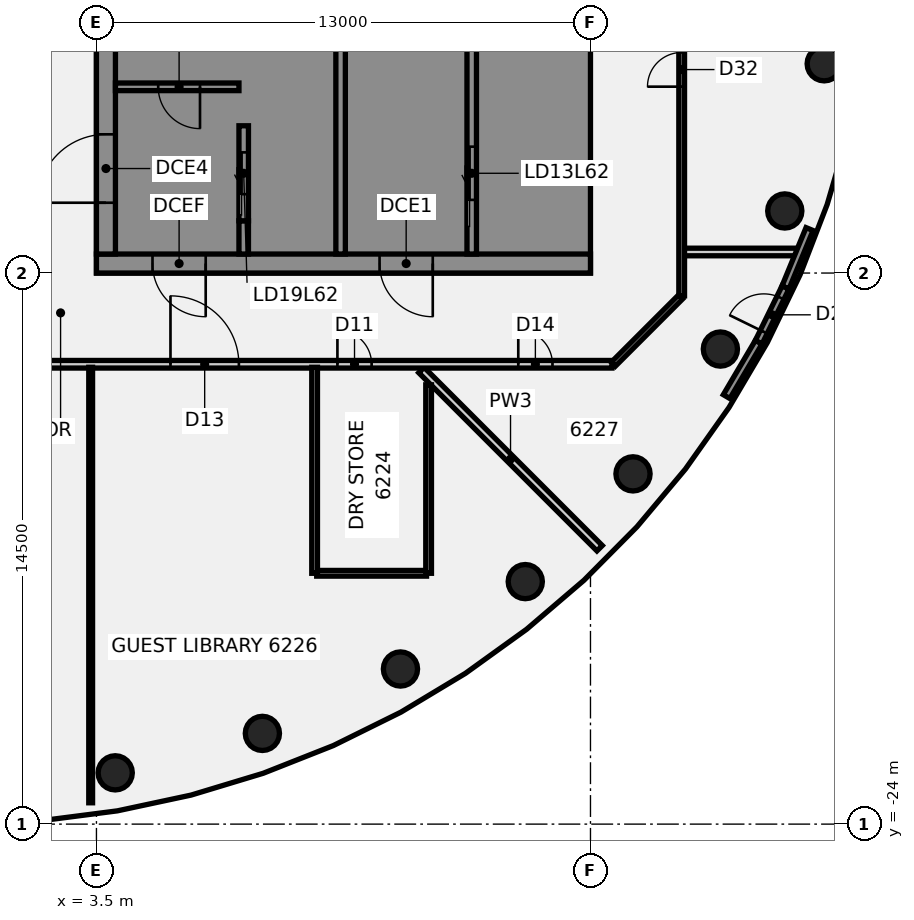
"""IFC4 building model, lengths in metres.
Left out: names, types, materials, properties, quantities, classifications, styles, units other than length and angle.
Written with IfcOpenShell. Run it as: python <this file> out.ifc"""

import sys

from ifc_helpers import new_model, si_unit, direction, frame, frame_2d, origin, origin_2d, place, context, subcontext, project, spatial, polyline, rectangle, circle, outline, extrude, element, fill, save


model = new_model("IFC4")
c1 = context("Model", 3, precision=1e-05, world=origin(), true_north=direction((0.0, 1.0)))
c2 = subcontext(c1, "Body", "Model", "MODEL_VIEW")
j1 = project(units=[si_unit("LENGTHUNIT", "METRE"), si_unit("PLANEANGLEUNIT", "RADIAN")], contexts=[c1])
p1 = place(None, origin())
s1 = spatial("IfcSite", under=j1, at=p1, CompositionType="ELEMENT")
p2 = place(p1, origin())
s2 = spatial("IfcBuilding", under=s1, at=p2, CompositionType="ELEMENT")
p3 = place(p2, frame((0.0, 0.0, 245.1)))
s3 = spatial("IfcBuildingStorey", under=s2, at=p3, CompositionType="ELEMENT", Elevation=245.1)
for number, where, z_axis, x_axis in (
    (1, (3.994, -22.651, -0.14), (0.0, 0.0, 1.0), (1.0, 0.0, 0.0)),
    (2, (7.866, -21.613, -0.14), (0.0, 0.0, 1.0), (1.0, 0.0, 0.0)),
    (3, (11.5, -19.919, -0.14), (0.0, 0.0, 1.0), (1.0, 0.0, 0.0)),
    (4, (14.784, -17.619, -0.14), (0.0, 0.0, 1.0), (1.0, 0.0, 0.0)),
    (5, (17.619, -14.784, -0.14), (0.0, 0.0, 1.0), (1.0, 0.0, 0.0)),
    (6, (19.919, -11.5, -0.14), (0.0, 0.0, 1.0), (1.0, 0.0, 0.0)),
    (7, (21.613, -7.866, -0.14), (0.0, 0.0, 1.0), (1.0, 0.0, 0.0)),
    (8, (22.651, -3.994, -0.14), (0.0, 0.0, 1.0), (1.0, 0.0, 0.0)),
):
    element("IfcColumn", number, at=place(p3, frame(where, z_axis=z_axis, x_axis=x_axis)), inside=s3, PredefinedType="COLUMN", context=c2, shape_type="SweptSolid", body=[
        extrude(circle(Radius=0.45, at=origin_2d()), origin(), (0.0, 0.0, 1.0), 3.6),
    ])
p4 = place(p3, frame((12.052, -12.052, 0.0), z_axis=(0.0, 0.0, 1.0), x_axis=(0.707106781187, -0.707106781187, 0.0)))
e9 = element("IfcWall", 9, at=p4, inside=s3, PredefinedType="PARTITIONING", context=c2, shape_type="SweptSolid", body=[
    extrude(rectangle(XDim=6.631, YDim=0.2, at=frame_2d((3.315, 0.0))), origin(), (0.0, 0.0, 1.0), 2.864),
])
p5 = place(p3, frame((-17.1, -11.9, 0.0), z_axis=(0.0, 0.0, 1.0), x_axis=(1.0, 0.0, 0.0)))
e10 = element("IfcWall", 10, at=p5, inside=s3, PredefinedType="PARTITIONING", context=c2, shape_type="SweptSolid", body=[
    extrude(rectangle(XDim=34.165, YDim=0.2, at=frame_2d((17.083, 0.0))), origin(), (0.0, 0.0, 1.0), 2.864),
])
p6 = place(p5, frame((9.85, 0.0, 0.0)))
e11 = element("IfcOpeningElement", 11, at=p6, cuts=e10, PredefinedType="OPENING", context=c2, shape_type="SweptSolid", body=[
    extrude(rectangle(XDim=0.9, YDim=2.1, at=frame_2d((0.45, 1.05))), frame((0.0, 0.11, 0.0), z_axis=(0.0, -1.0, 0.0), x_axis=(1.0, 0.0, 0.0)), (0.0, 0.0, 1.0), 0.22),
])
p7 = place(p5, frame((26.941, 0.0, 0.0)))
e12 = element("IfcOpeningElement", 12, at=p7, cuts=e10, PredefinedType="OPENING", context=c2, shape_type="SweptSolid", body=[
    extrude(rectangle(XDim=0.9, YDim=2.1, at=frame_2d((0.45, 1.05))), frame((0.0, 0.11, 0.0), z_axis=(0.0, -1.0, 0.0), x_axis=(1.0, 0.0, 0.0)), (0.0, 0.0, 1.0), 0.22),
])
p8 = place(p5, frame((16.059, 0.0, 0.0)))
e13 = element("IfcOpeningElement", 13, at=p8, cuts=e10, PredefinedType="OPENING", context=c2, shape_type="SweptSolid", body=[
    extrude(rectangle(XDim=1.8, YDim=2.1, at=frame_2d((0.9, 1.05))), frame((0.0, 0.11, 0.0), z_axis=(0.0, -1.0, 0.0), x_axis=(1.0, 0.0, 0.0)), (0.0, 0.0, 1.0), 0.22),
])
p9 = place(p5, frame((22.548, 0.0, 0.0)))
e14 = element("IfcOpeningElement", 14, at=p9, cuts=e10, PredefinedType="OPENING", context=c2, shape_type="SweptSolid", body=[
    extrude(rectangle(XDim=1.8, YDim=2.1, at=frame_2d((0.9, 1.05))), frame((0.0, 0.11, 0.0), z_axis=(0.0, -1.0, 0.0), x_axis=(1.0, 0.0, 0.0)), (0.0, 0.0, 1.0), 0.22),
])
p10 = place(p5, frame((31.7, 0.0, 0.0)))
e15 = element("IfcOpeningElement", 15, at=p10, cuts=e10, PredefinedType="OPENING", context=c2, shape_type="SweptSolid", body=[
    extrude(rectangle(XDim=0.9, YDim=2.1, at=frame_2d((0.45, 1.05))), frame((0.0, 0.11, 0.0), z_axis=(0.0, -1.0, 0.0), x_axis=(1.0, 0.0, 0.0)), (0.0, 0.0, 1.0), 0.22),
])
p11 = place(p5, frame((2.85, 0.0, 0.0)))
e16 = element("IfcOpeningElement", 16, at=p11, cuts=e10, PredefinedType="OPENING", context=c2, shape_type="SweptSolid", body=[
    extrude(rectangle(XDim=0.9, YDim=2.1, at=frame_2d((0.45, 1.05))), frame((0.0, 0.11, 0.0), z_axis=(0.0, -1.0, 0.0), x_axis=(1.0, 0.0, 0.0)), (0.0, 0.0, 1.0), 0.22),
])
p12 = place(p3, frame((9.296, -17.4, 0.0), z_axis=(0.0, 0.0, 1.0), x_axis=(1.0, 0.0, 0.0)))
e17 = element("IfcWall", 17, at=p12, inside=s3, PredefinedType="PARTITIONING", context=c2, shape_type="SweptSolid", body=[
    extrude(rectangle(XDim=2.89, YDim=0.15, at=frame_2d((1.445, 0.0))), origin(), (0.0, 0.0, 1.0), 2.864),
])
p13 = place(p3, frame((18.955, -8.946, 0.0), z_axis=(0.0, 0.0, 1.0), x_axis=(1.0, 0.0, 0.0)))
e18 = element("IfcWall", 18, at=p13, inside=s3, PredefinedType="PARTITIONING", context=c2, shape_type="SweptSolid", body=[
    extrude(rectangle(XDim=2.969, YDim=0.2, at=frame_2d((1.485, 0.0))), origin(), (0.0, 0.0, 1.0), 2.864),
])
p14 = place(p3, frame((17.1, -11.9, 0.0), z_axis=(0.0, 0.0, 1.0), x_axis=(0.707106781187, 0.707106781187, 0.0)))
e19 = element("IfcWall", 19, at=p14, inside=s3, PredefinedType="PARTITIONING", context=c2, shape_type="SweptSolid", body=[
    extrude(rectangle(XDim=2.505, YDim=0.15, at=frame_2d((1.253, 0.0))), origin(), (0.0, 0.0, 1.0), 2.864),
])
p15 = place(p3, frame((3.348, -23.439, 0.0), z_axis=(0.0, 0.0, 1.0), x_axis=(0.0, 1.0, 0.0)))
e20 = element("IfcWall", 20, at=p15, inside=s3, PredefinedType="PARTITIONING", context=c2, shape_type="SweptSolid", body=[
    extrude(rectangle(XDim=11.459, YDim=0.1, at=frame_2d((5.729, 0.0))), origin(), (0.0, 0.0, 1.0), 2.864),
])
p16 = place(p3, frame((9.241, -17.4, 0.0), z_axis=(0.0, 0.0, 1.0), x_axis=(0.0, 1.0, 0.0)))
e21 = element("IfcWall", 21, at=p16, inside=s3, PredefinedType="PARTITIONING", context=c2, shape_type="SweptSolid", body=[
    extrude(rectangle(XDim=5.42, YDim=0.15, at=frame_2d((2.71, 0.0))), origin(), (0.0, 0.0, 1.0), 2.864),
])
p17 = place(p3, frame((12.241, -17.4, 0.0), z_axis=(0.0, 0.0, 1.0), x_axis=(0.0, 1.0, 0.0)))
e22 = element("IfcWall", 22, at=p17, inside=s3, PredefinedType="PARTITIONING", context=c2, shape_type="SweptSolid", body=[
    extrude(rectangle(XDim=4.959, YDim=0.15, at=frame_2d((2.479, 0.0))), origin(), (0.0, 0.0, 1.0), 2.864),
])
p18 = place(p3, frame((18.9, -10.1, 0.0), z_axis=(0.0, 0.0, 1.0), x_axis=(0.0, 1.0, 0.0)))
e23 = element("IfcWall", 23, at=p18, inside=s3, PredefinedType="PARTITIONING", context=c2, shape_type="SweptSolid", body=[
    extrude(rectangle(XDim=20.2, YDim=0.15, at=frame_2d((10.1, 0.0))), origin(), (0.0, 0.0, 1.0), 2.864),
])
p19 = place(p18, frame((5.504, 0.0, 0.0)))
e24 = element("IfcOpeningElement", 24, at=p19, cuts=e23, PredefinedType="OPENING", context=c2, shape_type="SweptSolid", body=[
    extrude(rectangle(XDim=0.9, YDim=2.1, at=frame_2d((0.45, 1.05))), frame((0.0, 0.085, 0.0), z_axis=(0.0, -1.0, 0.0), x_axis=(1.0, 0.0, 0.0)), (0.0, 0.0, 1.0), 0.17),
])
p20 = place(p3, frame((20.082, -12.751, 0.0), z_axis=(0.0, 0.0, 1.0), x_axis=(0.508205434936, 0.86123587704, 0.0)))
e25 = element("IfcWall", 25, at=p20, inside=s3, PredefinedType="SOLIDWALL", context=c2, shape_type="SweptSolid", body=[
    extrude(rectangle(XDim=1.665, YDim=0.2, at=frame_2d((0.832, 0.0))), origin(), (0.0, 0.0, 1.0), 3.46),
])
p21 = place(p3, frame((21.631, -9.881, 0.0), z_axis=(0.0, 0.0, 1.0), x_axis=(0.380860529155, 0.924632498527, 0.0)))
e26 = element("IfcWall", 26, at=p21, inside=s3, PredefinedType="SOLIDWALL", context=c2, shape_type="SweptSolid", body=[
    extrude(rectangle(XDim=1.664, YDim=0.2, at=frame_2d((0.832, 0.0))), origin(), (0.0, 0.0, 1.0), 3.46),
])
p22 = place(p3, frame((20.928, -11.317, 0.0), z_axis=(0.0, 0.0, 1.0), x_axis=(0.439689088119, 0.898150046367, 0.0)))
e27 = element("IfcWall", 27, at=p22, inside=s3, PredefinedType="SOLIDWALL", context=c2, shape_type="SweptSolid", body=[
    extrude(rectangle(XDim=1.6, YDim=0.2, at=frame_2d((0.8, 0.0))), origin(), (0.0, 0.0, 1.0), 3.46),
])
p23 = place(p22, frame((0.3, 0.0, 0.0)))
e28 = element("IfcOpeningElement", 28, at=p23, cuts=e27, PredefinedType="OPENING", context=c2, shape_type="SweptSolid", body=[
    extrude(rectangle(XDim=1.0, YDim=2.4, at=frame_2d((0.5, 1.2))), frame((0.0, 0.11, 0.0), z_axis=(0.0, -1.0, 0.0), x_axis=(1.0, 0.0, 0.0)), (0.0, 0.0, 1.0), 0.22),
])
p24 = place(p3, frame((16.5, -9.25, 0.0), z_axis=(0.0, 0.0, 1.0), x_axis=(-1.0, 0.0, 0.0)))
e29 = element("IfcWall", 29, at=p24, inside=s3, PredefinedType="SHEAR", context=c2, shape_type="SweptSolid", body=[
    extrude(rectangle(XDim=13.0, YDim=0.5, at=frame_2d((6.5, 0.0))), origin(), (0.0, 0.0, 1.0), 3.46),
])
p25 = place(p24, frame((4.15, 0.0, 0.0)))
e30 = element("IfcOpeningElement", 30, at=p25, cuts=e29, PredefinedType="OPENING", context=c2, shape_type="SweptSolid", body=[
    extrude(rectangle(XDim=1.4, YDim=2.1, at=frame_2d((0.7, 1.05))), frame((0.0, 0.26, 0.0), z_axis=(0.0, -1.0, 0.0), x_axis=(1.0, 0.0, 0.0)), (0.0, 0.0, 1.0), 0.52),
])
p26 = place(p24, frame((10.125, 0.0, 0.0)))
e31 = element("IfcOpeningElement", 31, at=p26, cuts=e29, PredefinedType="OPENING", context=c2, shape_type="SweptSolid", body=[
    extrude(rectangle(XDim=1.4, YDim=2.1, at=frame_2d((0.7, 1.05))), frame((0.0, 0.26, 0.0), z_axis=(0.0, -1.0, 0.0), x_axis=(1.0, 0.0, 0.0)), (0.0, 0.0, 1.0), 0.52),
])
p27 = place(p3, origin())
e32 = element("IfcWall", 32, at=p27, inside=s3, PredefinedType="SHEAR", context=c2, shape_type="SweptSolid", body=[
    extrude(outline(polyline([(13.5, -8.125), (13.5, -9.0), (16.0, -9.0), (16.5, -9.0), (16.5, 9.0), (16.0, 9.0), (13.5, 9.0), (13.5, 8.125), (16.0, 8.125), (16.0, 5.625), (13.5, 5.625), (13.5, 5.375), (16.0, 5.375), (16.0, -5.375), (13.5, -5.375), (13.5, -5.625), (16.0, -5.625), (16.0, -8.125), (13.5, -8.125)])), origin(), (0.0, 0.0, 1.0), 3.46),
])
p28 = place(p3, origin())
e33 = element("IfcWall", 33, at=p28, inside=s3, PredefinedType="SHEAR", context=c2, shape_type="SweptSolid", body=[
    extrude(outline(polyline([(9.8, -5.375), (7.5, -5.375), (7.5, 2.625), (9.8, 2.625), (9.8, 2.875), (7.5, 2.875), (7.5, 5.375), (9.8, 5.375), (9.8, 5.625), (7.5, 5.625), (7.5, 8.125), (9.8, 8.125), (9.8, 9.0), (7.5, 9.0), (7.25, 9.0), (7.25, -5.625), (7.5, -5.625), (9.8, -5.625), (9.8, -5.375)])), origin(), (0.0, 0.0, 1.0), 3.46),
])
p29 = place(p3, origin())
e34 = element("IfcWall", 34, at=p29, inside=s3, PredefinedType="SHEAR", context=c2, shape_type="SweptSolid", body=[
    extrude(outline(polyline([(7.5, -8.125), (7.5, -9.0), (9.8, -9.0), (9.8, -8.125), (9.8, -5.625), (9.55, -5.625), (9.55, -8.125), (7.5, -8.125)])), origin(), (0.0, 0.0, 1.0), 3.46),
])
p30 = place(p3, frame((7.375, -9.0, 0.0), z_axis=(0.0, 0.0, 1.0), x_axis=(0.0, 1.0, 0.0)))
e35 = element("IfcWall", 35, at=p30, inside=s3, PredefinedType="SHEAR", context=c2, shape_type="SweptSolid", body=[
    extrude(rectangle(XDim=0.875, YDim=0.25, at=frame_2d((0.438, 0.0))), origin(), (0.0, 0.0, 1.0), 3.46),
])
p31 = place(p3, frame((13.375, -9.0, 0.0), z_axis=(0.0, 0.0, 1.0), x_axis=(0.0, 1.0, 0.0)))
e36 = element("IfcWall", 36, at=p31, inside=s3, PredefinedType="SHEAR", context=c2, shape_type="SweptSolid", body=[
    extrude(rectangle(XDim=18.0, YDim=0.25, at=frame_2d((9.0, 0.0))), origin(), (0.0, 0.0, 1.0), 3.46),
])
p32 = place(p31, frame((1.425, 0.0, 0.0)))
e37 = element("IfcOpeningElement", 37, at=p32, cuts=e36, PredefinedType="OPENING", context=c2, shape_type="SweptSolid", body=[
    extrude(rectangle(XDim=1.4, YDim=2.1, at=frame_2d((0.7, 1.05))), frame((0.0, 0.135, 0.0), z_axis=(0.0, -1.0, 0.0), x_axis=(1.0, 0.0, 0.0)), (0.0, 0.0, 1.0), 0.27),
])
p33 = place(p31, frame((6.646, 0.0, 0.0)))
e38 = element("IfcOpeningElement", 38, at=p33, cuts=e36, PredefinedType="OPENING", context=c2, shape_type="SweptSolid", body=[
    extrude(rectangle(XDim=1.0, YDim=2.1, at=frame_2d((0.5, 1.05))), frame((0.0, 0.135, 0.0), z_axis=(0.0, -1.0, 0.0), x_axis=(1.0, 0.0, 0.0)), (0.0, 0.0, 1.0), 0.27),
])
p34 = place(p31, frame((12.146, 0.0, 0.0)))
e39 = element("IfcOpeningElement", 39, at=p34, cuts=e36, PredefinedType="OPENING", context=c2, shape_type="SweptSolid", body=[
    extrude(rectangle(XDim=1.0, YDim=2.1, at=frame_2d((0.5, 1.05))), frame((0.0, 0.135, 0.0), z_axis=(0.0, -1.0, 0.0), x_axis=(1.0, 0.0, 0.0)), (0.0, 0.0, 1.0), 0.27),
])
p35 = place(p3, frame((9.925, -9.0, 0.0), z_axis=(0.0, 0.0, 1.0), x_axis=(0.0, 1.0, 0.0)))
e40 = element("IfcWall", 40, at=p35, inside=s3, PredefinedType="SHEAR", context=c2, shape_type="SweptSolid", body=[
    extrude(rectangle(XDim=18.0, YDim=0.25, at=frame_2d((9.0, 0.0))), origin(), (0.0, 0.0, 1.0), 3.46),
])
p36 = place(p35, frame((12.575, 0.0, 0.0)))
e41 = element("IfcOpeningElement", 41, at=p36, cuts=e40, PredefinedType="OPENING", context=c2, shape_type="SweptSolid", body=[
    extrude(rectangle(XDim=1.1, YDim=2.1, at=frame_2d((0.55, 1.05))), frame((0.0, 0.135, 0.0), z_axis=(0.0, -1.0, 0.0), x_axis=(1.0, 0.0, 0.0)), (0.0, 0.0, 1.0), 0.27),
])
p37 = place(p35, frame((15.325, 0.0, 0.0)))
e42 = element("IfcOpeningElement", 42, at=p37, cuts=e40, PredefinedType="OPENING", context=c2, shape_type="SweptSolid", body=[
    extrude(rectangle(XDim=1.1, YDim=2.1, at=frame_2d((0.55, 1.05))), frame((0.0, 0.135, 0.0), z_axis=(0.0, -1.0, 0.0), x_axis=(1.0, 0.0, 0.0)), (0.0, 0.0, 1.0), 0.27),
])
p38 = place(p35, frame((5.75, 0.0, 0.0)))
e43 = element("IfcOpeningElement", 43, at=p38, cuts=e40, PredefinedType="OPENING", context=c2, shape_type="SweptSolid", body=[
    extrude(rectangle(XDim=1.0, YDim=2.1, at=frame_2d((0.5, 1.05))), frame((0.0, 0.135, 0.0), z_axis=(0.0, -1.0, 0.0), x_axis=(1.0, 0.0, 0.0)), (0.0, 0.0, 1.0), 0.27),
])
p39 = place(p35, frame((9.875, 0.0, 0.0)))
e44 = element("IfcOpeningElement", 44, at=p39, cuts=e40, PredefinedType="OPENING", context=c2, shape_type="SweptSolid", body=[
    extrude(rectangle(XDim=1.0, YDim=2.1, at=frame_2d((0.5, 1.05))), frame((0.0, 0.135, 0.0), z_axis=(0.0, -1.0, 0.0), x_axis=(1.0, 0.0, 0.0)), (0.0, 0.0, 1.0), 0.27),
])
p40 = place(p3, frame((7.375, -8.125, 0.0), z_axis=(0.0, 0.0, 1.0), x_axis=(0.0, 1.0, 0.0)))
e45 = element("IfcWall", 45, at=p40, inside=s3, PredefinedType="SHEAR", context=c2, shape_type="SweptSolid", body=[
    extrude(rectangle(XDim=2.5, YDim=0.25, at=frame_2d((1.25, 0.0))), origin(), (0.0, 0.0, 1.0), 3.46),
])
p41 = place(p40, frame((0.7, 0.0, 0.0)))
e46 = element("IfcOpeningElement", 46, at=p41, cuts=e45, PredefinedType="OPENING", context=c2, shape_type="SweptSolid", body=[
    extrude(rectangle(XDim=1.1, YDim=2.1, at=frame_2d((0.55, 1.05))), frame((0.0, 0.135, 0.0), z_axis=(0.0, -1.0, 0.0), x_axis=(1.0, 0.0, 0.0)), (0.0, 0.0, 1.0), 0.27),
])
p42 = place(p3, frame((3.75, -9.0, 0.0), z_axis=(0.0, 0.0, 1.0), x_axis=(0.0, 1.0, 0.0)))
e47 = element("IfcWall", 47, at=p42, inside=s3, PredefinedType="SHEAR", context=c2, shape_type="SweptSolid", body=[
    extrude(rectangle(XDim=18.0, YDim=0.5, at=frame_2d((9.0, 0.0))), origin(), (0.0, 0.0, 1.0), 3.46),
])
p43 = place(p42, frame((1.35, 0.0, 0.0)))
e48 = element("IfcOpeningElement", 48, at=p43, cuts=e47, PredefinedType="OPENING", context=c2, shape_type="SweptSolid", body=[
    extrude(rectangle(XDim=1.8, YDim=2.1, at=frame_2d((0.9, 1.05))), frame((0.0, 0.26, 0.0), z_axis=(0.0, -1.0, 0.0), x_axis=(1.0, 0.0, 0.0)), (0.0, 0.0, 1.0), 0.52),
])
p44 = place(p42, frame((11.798, 0.0, 0.0)))
e49 = element("IfcOpeningElement", 49, at=p44, cuts=e47, PredefinedType="OPENING", context=c2, shape_type="SweptSolid", body=[
    extrude(rectangle(XDim=1.0, YDim=2.1, at=frame_2d((0.5, 1.05))), frame((0.0, 0.26, 0.0), z_axis=(0.0, -1.0, 0.0), x_axis=(1.0, 0.0, 0.0)), (0.0, 0.0, 1.0), 0.52),
])
p45 = place(p42, frame((15.323, 0.0, 0.0)))
e50 = element("IfcOpeningElement", 50, at=p45, cuts=e47, PredefinedType="OPENING", context=c2, shape_type="SweptSolid", body=[
    extrude(rectangle(XDim=1.0, YDim=2.1, at=frame_2d((0.5, 1.05))), frame((0.0, 0.26, 0.0), z_axis=(0.0, -1.0, 0.0), x_axis=(1.0, 0.0, 0.0)), (0.0, 0.0, 1.0), 0.52),
])
p46 = place(p3, frame((7.25, -4.6, 0.0), z_axis=(0.0, 0.0, 1.0), x_axis=(-1.0, 0.0, 0.0)))
e51 = element("IfcWall", 51, at=p46, inside=s3, PredefinedType="SHEAR", context=c2, shape_type="SweptSolid", body=[
    extrude(rectangle(XDim=3.25, YDim=0.2, at=frame_2d((1.625, 0.0))), origin(), (0.0, 0.0, 1.0), 3.46),
])
p47 = place(p46, frame((1.025, 0.0, 0.0)))
e52 = element("IfcOpeningElement", 52, at=p47, cuts=e51, PredefinedType="OPENING", context=c2, shape_type="SweptSolid", body=[
    extrude(rectangle(XDim=1.1, YDim=2.1, at=frame_2d((0.55, 1.05))), frame((0.0, 0.11, 0.0), z_axis=(0.0, -1.0, 0.0), x_axis=(1.0, 0.0, 0.0)), (0.0, 0.0, 1.0), 0.22),
])
p48 = place(p7, frame((0.9, 0.0, 0.0), z_axis=(0.0, 0.0, 1.0), x_axis=(-1.0, 0.0, 0.0)))
e53 = element("IfcDoor", 53, at=p48, inside=s3, OperationType="SINGLE_SWING_RIGHT", PredefinedType="DOOR", context=c2, shape_type="SweptSolid", body=[
    extrude(rectangle(XDim=0.9, YDim=2.1, at=frame_2d((0.45, 1.05))), frame((0.0, 0.025, 0.0), z_axis=(0.0, -1.0, 0.0), x_axis=(1.0, 0.0, 0.0)), (0.0, 0.0, 1.0), 0.05),
])
fill(e12, e53)
p49 = place(p9, frame((1.8, 0.0, 0.0), z_axis=(0.0, 0.0, 1.0), x_axis=(-1.0, 0.0, 0.0)))
e54 = element("IfcDoor", 54, at=p49, inside=s3, OperationType="DOUBLE_DOOR_SINGLE_SWING", PredefinedType="DOOR", context=c2, shape_type="SweptSolid", body=[
    extrude(rectangle(XDim=1.8, YDim=2.1, at=frame_2d((0.9, 1.05))), frame((0.0, 0.025, 0.0), z_axis=(0.0, -1.0, 0.0), x_axis=(1.0, 0.0, 0.0)), (0.0, 0.0, 1.0), 0.05),
])
fill(e14, e54)
p50 = place(p10, frame((0.9, 0.0, 0.0), z_axis=(0.0, 0.0, 1.0), x_axis=(-1.0, 0.0, 0.0)))
e55 = element("IfcDoor", 55, at=p50, inside=s3, OperationType="SINGLE_SWING_RIGHT", PredefinedType="DOOR", context=c2, shape_type="SweptSolid", body=[
    extrude(rectangle(XDim=0.9, YDim=2.1, at=frame_2d((0.45, 1.05))), frame((0.0, 0.025, 0.0), z_axis=(0.0, -1.0, 0.0), x_axis=(1.0, 0.0, 0.0)), (0.0, 0.0, 1.0), 0.05),
])
fill(e15, e55)
p51 = place(p19, frame((0.9, 0.0, 0.0), z_axis=(0.0, 0.0, 1.0), x_axis=(-1.0, 0.0, 0.0)))
e56 = element("IfcDoor", 56, at=p51, inside=s3, OperationType="SINGLE_SWING_LEFT", PredefinedType="DOOR", context=c2, shape_type="SweptSolid", body=[
    extrude(rectangle(XDim=0.9, YDim=2.1, at=frame_2d((0.45, 1.05))), frame((0.0, 0.025, 0.0), z_axis=(0.0, -1.0, 0.0), x_axis=(1.0, 0.0, 0.0)), (0.0, 0.0, 1.0), 0.05),
])
fill(e24, e56)
p52 = place(p23, origin())
e57 = element("IfcDoor", 57, at=p52, inside=s3, OperationType="SINGLE_SWING_LEFT", PredefinedType="DOOR", context=c2, shape_type="SweptSolid", body=[
    extrude(rectangle(XDim=1.0, YDim=2.4, at=frame_2d((0.5, 1.2))), frame((0.0, 0.025, 0.0), z_axis=(0.0, -1.0, 0.0), x_axis=(1.0, 0.0, 0.0)), (0.0, 0.0, 1.0), 0.05),
])
fill(e28, e57)
p53 = place(p25, origin())
e58 = element("IfcDoor", 58, at=p53, inside=s3, OperationType="SINGLE_SWING_LEFT", PredefinedType="DOOR", context=c2, shape_type="SweptSolid", body=[
    extrude(rectangle(XDim=1.4, YDim=2.1, at=frame_2d((0.7, 1.05))), frame((0.0, 0.025, 0.0), z_axis=(0.0, -1.0, 0.0), x_axis=(1.0, 0.0, 0.0)), (0.0, 0.0, 1.0), 0.05),
])
fill(e30, e58)
p54 = place(p26, origin())
e59 = element("IfcDoor", 59, at=p54, inside=s3, OperationType="SINGLE_SWING_LEFT", PredefinedType="DOOR", context=c2, shape_type="SweptSolid", body=[
    extrude(rectangle(XDim=1.4, YDim=2.1, at=frame_2d((0.7, 1.05))), frame((0.0, 0.025, 0.0), z_axis=(0.0, -1.0, 0.0), x_axis=(1.0, 0.0, 0.0)), (0.0, 0.0, 1.0), 0.05),
])
fill(e31, e59)
p55 = place(p43, origin())
e60 = element("IfcDoor", 60, at=p55, inside=s3, OperationType="SINGLE_SWING_LEFT", PredefinedType="DOOR", context=c2, shape_type="SweptSolid", body=[
    extrude(rectangle(XDim=1.8, YDim=2.1, at=frame_2d((0.9, 1.05))), frame((0.0, 0.025, 0.0), z_axis=(0.0, -1.0, 0.0), x_axis=(1.0, 0.0, 0.0)), (0.0, 0.0, 1.0), 0.05),
])
fill(e48, e60)
p56 = place(p47, origin())
e61 = element("IfcDoor", 61, at=p56, inside=s3, OperationType="SINGLE_SWING_LEFT", PredefinedType="DOOR", context=c2, shape_type="SweptSolid", body=[
    extrude(rectangle(XDim=1.1, YDim=2.1, at=frame_2d((0.55, 1.05))), frame((0.0, 0.025, 0.0), z_axis=(0.0, -1.0, 0.0), x_axis=(1.0, 0.0, 0.0)), (0.0, 0.0, 1.0), 0.05),
])
fill(e52, e61)
p57 = place(p32, origin())
e62 = element("IfcDoor", 62, at=p57, inside=s3, OperationType="SLIDING_TO_LEFT", PredefinedType="DOOR", context=c2, shape_type="SweptSolid", body=[
    extrude(rectangle(XDim=1.4, YDim=2.1, at=frame_2d((0.7, 1.05))), frame((0.0, 0.025, 0.0), z_axis=(0.0, -1.0, 0.0), x_axis=(1.0, 0.0, 0.0)), (0.0, 0.0, 1.0), 0.05),
])
fill(e37, e62)
p58 = place(p41, origin())
e63 = element("IfcDoor", 63, at=p58, inside=s3, OperationType="SLIDING_TO_LEFT", PredefinedType="DOOR", context=c2, shape_type="SweptSolid", body=[
    extrude(rectangle(XDim=1.1, YDim=2.1, at=frame_2d((0.55, 1.05))), frame((0.0, 0.025, 0.0), z_axis=(0.0, -1.0, 0.0), x_axis=(1.0, 0.0, 0.0)), (0.0, 0.0, 1.0), 0.05),
])
fill(e46, e63)
save(model, sys.argv[1])
